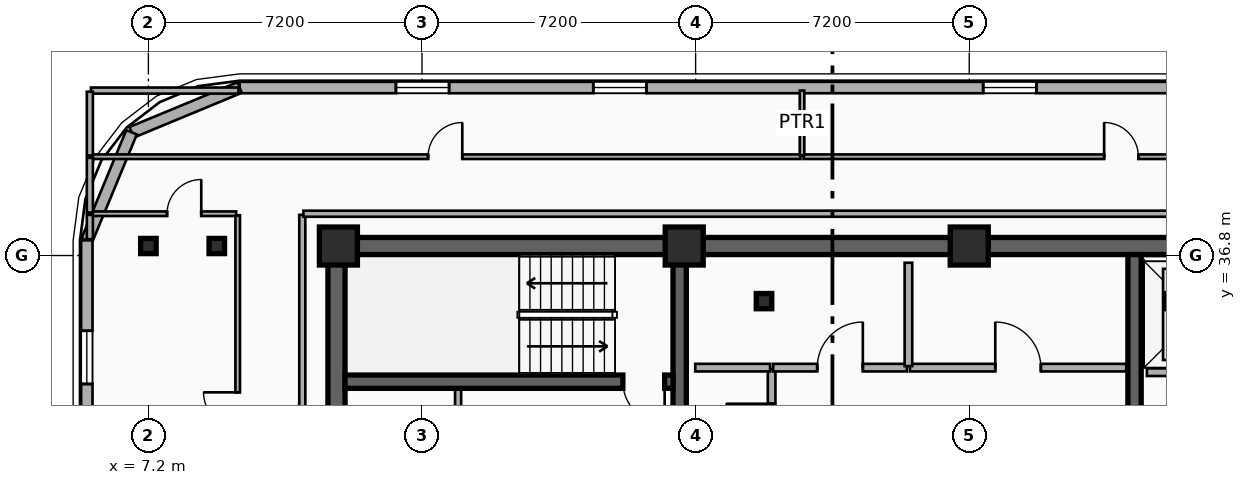
"""IFC4 building model, lengths in metres.
Left out: names, types, materials, properties, quantities, classifications, styles, units other than length and angle.
Written with IfcOpenShell. Run it as: python <this file> out.ifc"""

import sys

from ifc_helpers import new_model, si_unit, direction, frame, frame_2d, origin, origin_2d, place, context, subcontext, project, spatial, rectangle, i_section, extrude, element, fill, save


model = new_model("IFC4")
c1 = context("Model", 3, precision=1e-05, world=origin(), true_north=direction((0.0, 1.0)))
c2 = subcontext(c1, "Body", "Model", "MODEL_VIEW")
j1 = project(units=[si_unit("LENGTHUNIT", "METRE"), si_unit("PLANEANGLEUNIT", "RADIAN")], contexts=[c1])
p1 = place(None, origin())
s1 = spatial("IfcSite", under=j1, at=p1, CompositionType="ELEMENT")
p2 = place(p1, origin())
s2 = spatial("IfcBuilding", under=s1, at=p2, CompositionType="ELEMENT")
p3 = place(p2, frame((0.0, 0.0, 207.6)))
s3 = spatial("IfcBuildingStorey", under=s2, at=p3, CompositionType="ELEMENT", Elevation=207.6)
p4 = place(p3, frame((12.15, 37.05, 0.0), z_axis=(0.0, 0.0, 1.0), x_axis=(1.0, 0.0, 0.0)))
e1 = element("IfcWall", 1, at=p4, inside=s3, PredefinedType="SHEAR", context=c2, shape_type="SweptSolid", body=[
    extrude(rectangle(XDim=33.23, YDim=0.45, at=frame_2d((16.615, 0.0))), origin(), (0.0, 0.0, 1.0), 3.6),
])
p5 = place(p3, frame((12.15, 28.045, 0.0), z_axis=(0.0, 0.0, 1.0), x_axis=(0.0, 1.0, 0.0)))
e2 = element("IfcWall", 2, at=p5, inside=s3, PredefinedType="SHEAR", context=c2, shape_type="SweptSolid", body=[
    extrude(rectangle(XDim=8.78, YDim=0.45, at=frame_2d((4.39, 0.0))), origin(), (0.0, 0.0, 1.0), 3.6),
])
for number, where, z_axis, x_axis in (
    (3, (21.18, 28.045, 0.0), (0.0, 0.0, 1.0), (0.0, 1.0, 0.0)),
    (4, (33.15, 28.045, 0.0), (0.0, 0.0, 1.0), (0.0, 1.0, 0.0)),
):
    element("IfcWall", number, at=place(p3, frame(where, z_axis=z_axis, x_axis=x_axis)), inside=s3, PredefinedType="SHEAR", context=c2, shape_type="SweptSolid", body=[
        extrude(rectangle(XDim=8.78, YDim=0.35, at=frame_2d((4.39, 0.0))), origin(), (0.0, 0.0, 1.0), 3.6),
    ])
p6 = place(p3, frame((21.005, 33.48, 0.0), z_axis=(0.0, 0.0, 1.0), x_axis=(-1.0, 0.0, 0.0)))
e5 = element("IfcWall", 5, at=p6, inside=s3, PredefinedType="SHEAR", context=c2, shape_type="SweptSolid", body=[
    extrude(rectangle(XDim=8.63, YDim=0.35, at=frame_2d((4.315, 0.0))), origin(), (0.0, 0.0, 1.0), 3.6),
])
p7 = place(p6, frame((0.22, 0.0, 0.0)))
e6 = element("IfcOpeningElement", 6, at=p7, cuts=e5, PredefinedType="OPENING", context=c2, shape_type="SweptSolid", body=[
    extrude(rectangle(XDim=1.1, YDim=2.15, at=frame_2d((0.55, 1.075))), frame((0.0, 0.185, 0.0), z_axis=(0.0, -1.0, 0.0), x_axis=(1.0, 0.0, 0.0)), (0.0, 0.0, 1.0), 0.37),
])
p8 = place(p3, frame((23.4, 35.6, 0.0), z_axis=(0.0, 0.0, 1.0), x_axis=(1.0, 0.0, 0.0)))
e7 = element("IfcColumn", 7, at=p8, inside=s3, PredefinedType="COLUMN", context=c2, shape_type="SweptSolid", body=[
    extrude(i_section(OverallWidth=0.408, OverallDepth=0.4, WebThickness=0.025, FlangeThickness=0.039, FilletRadius=0.015, at=origin_2d()), origin(), (0.0, 0.0, 1.0), 3.6),
])
for number, where, z_axis, x_axis in (
    (8, (12.2, 37.05, 0.0), (0.0, 0.0, 1.0), (1.0, 0.0, 0.0)),
    (9, (21.3, 37.05, 0.0), (0.0, 0.0, 1.0), (1.0, 0.0, 0.0)),
    (10, (28.8, 37.05, 0.0), (0.0, 0.0, 1.0), (1.0, 0.0, 0.0)),
):
    element("IfcColumn", number, at=place(p3, frame(where, z_axis=z_axis, x_axis=x_axis)), inside=s3, PredefinedType="COLUMN", context=c2, shape_type="SweptSolid", body=[
        extrude(rectangle(XDim=1.0, YDim=1.0, at=origin_2d()), origin(), (0.0, 0.0, 1.0), 3.6),
    ])
for number, where, z_axis, x_axis in (
    (11, (9.0, 37.05, 0.0), (0.0, 0.0, 1.0), (1.0, 0.0, 0.0)),
    (12, (7.2, 37.05, 0.0), (0.0, 0.0, 1.0), (1.0, 0.0, 0.0)),
):
    element("IfcColumn", number, at=place(p3, frame(where, z_axis=z_axis, x_axis=x_axis)), inside=s3, PredefinedType="COLUMN", context=c2, shape_type="SweptSolid", body=[
        extrude(i_section(OverallWidth=0.408, OverallDepth=0.4, WebThickness=0.025, FlangeThickness=0.039, FilletRadius=0.015, at=origin_2d()), origin(), (0.0, 0.0, 1.0), 3.6),
    ])
p9 = place(p3, frame((9.6, 41.22, 0.0), z_axis=(0.0, 0.0, 1.0), x_axis=(1.0, 0.0, 0.0)))
e13 = element("IfcWall", 13, at=p9, inside=s3, PredefinedType="SOLIDWALL", context=c2, shape_type="SweptSolid", body=[
    extrude(rectangle(XDim=38.4, YDim=0.3, at=frame_2d((19.2, 0.0))), origin(), (0.0, 0.0, 1.0), 3.34),
])
p10 = place(p9, frame((4.113, 0.0, 0.75)))
e14 = element("IfcOpeningElement", 14, at=p10, cuts=e13, PredefinedType="OPENING", context=c2, shape_type="SweptSolid", body=[
    extrude(rectangle(XDim=1.4, YDim=2.1, at=frame_2d((0.7, 1.05))), frame((0.0, 0.16, 0.0), z_axis=(0.0, -1.0, 0.0), x_axis=(1.0, 0.0, 0.0)), (0.0, 0.0, 1.0), 0.32),
])
p11 = place(p9, frame((9.307, 0.0, 0.75)))
e15 = element("IfcOpeningElement", 15, at=p11, cuts=e13, PredefinedType="OPENING", context=c2, shape_type="SweptSolid", body=[
    extrude(rectangle(XDim=1.4, YDim=2.1, at=frame_2d((0.7, 1.05))), frame((0.0, 0.16, 0.0), z_axis=(0.0, -1.0, 0.0), x_axis=(1.0, 0.0, 0.0)), (0.0, 0.0, 1.0), 0.32),
])
p12 = place(p9, frame((19.567, 0.0, 0.75)))
e16 = element("IfcOpeningElement", 16, at=p12, cuts=e13, PredefinedType="OPENING", context=c2, shape_type="SweptSolid", body=[
    extrude(rectangle(XDim=1.4, YDim=2.1, at=frame_2d((0.7, 1.05))), frame((0.0, 0.16, 0.0), z_axis=(0.0, -1.0, 0.0), x_axis=(1.0, 0.0, 0.0)), (0.0, 0.0, 1.0), 0.32),
])
p13 = place(p9, frame((25.433, 0.0, 0.75)))
e17 = element("IfcOpeningElement", 17, at=p13, cuts=e13, PredefinedType="OPENING", context=c2, shape_type="SweptSolid", body=[
    extrude(rectangle(XDim=1.4, YDim=2.1, at=frame_2d((0.7, 1.05))), frame((0.0, 0.16, 0.0), z_axis=(0.0, -1.0, 0.0), x_axis=(1.0, 0.0, 0.0)), (0.0, 0.0, 1.0), 0.32),
])
p14 = place(p3, frame((6.757, 40.042, 0.0), z_axis=(0.0, 0.0, 1.0), x_axis=(0.923882414032, 0.382676475685, 0.0)))
e18 = element("IfcWall", 18, at=p14, inside=s3, PredefinedType="SOLIDWALL", context=c2, shape_type="SweptSolid", body=[
    extrude(rectangle(XDim=3.077, YDim=0.3, at=frame_2d((1.539, 0.0))), origin(), (0.0, 0.0, 1.0), 3.34),
])
p15 = place(p3, frame((5.58, 37.2, 0.0), z_axis=(0.0, 0.0, 1.0), x_axis=(0.382636798336, 0.92389884758, 0.0)))
e19 = element("IfcWall", 19, at=p15, inside=s3, PredefinedType="SOLIDWALL", context=c2, shape_type="SweptSolid", body=[
    extrude(rectangle(XDim=3.077, YDim=0.3, at=frame_2d((1.538, 0.0))), origin(), (0.0, 0.0, 1.0), 3.34),
])
p16 = place(p3, frame((5.58, 8.6, 0.0), z_axis=(0.0, 0.0, 1.0), x_axis=(0.0, 1.0, 0.0)))
e20 = element("IfcWall", 20, at=p16, inside=s3, PredefinedType="SOLIDWALL", context=c2, shape_type="SweptSolid", body=[
    extrude(rectangle(XDim=28.6, YDim=0.3, at=frame_2d((14.3, 0.0))), origin(), (0.0, 0.0, 1.0), 3.34),
])
p17 = place(p16, frame((21.36, 0.0, 0.34)))
e21 = element("IfcOpeningElement", 21, at=p17, cuts=e20, PredefinedType="OPENING", context=c2, shape_type="SweptSolid", body=[
    extrude(rectangle(XDim=1.4, YDim=2.1, at=frame_2d((0.7, 1.05))), frame((0.0, 0.16, 0.0), z_axis=(0.0, -1.0, 0.0), x_axis=(1.0, 0.0, 0.0)), (0.0, 0.0, 1.0), 0.32),
])
p18 = place(p16, frame((24.82, 0.0, 0.34)))
e22 = element("IfcOpeningElement", 22, at=p18, cuts=e20, PredefinedType="OPENING", context=c2, shape_type="SweptSolid", body=[
    extrude(rectangle(XDim=1.4, YDim=2.1, at=frame_2d((0.7, 1.05))), frame((0.0, 0.16, 0.0), z_axis=(0.0, -1.0, 0.0), x_axis=(1.0, 0.0, 0.0)), (0.0, 0.0, 1.0), 0.32),
])
p19 = place(p16, frame((4.797, 0.0, 0.34)))
e23 = element("IfcOpeningElement", 23, at=p19, cuts=e20, PredefinedType="OPENING", context=c2, shape_type="SweptSolid", body=[
    extrude(rectangle(XDim=1.4, YDim=2.1, at=frame_2d((0.7, 1.05))), frame((0.0, 0.16, 0.0), z_axis=(0.0, -1.0, 0.0), x_axis=(1.0, 0.0, 0.0)), (0.0, 0.0, 1.0), 0.32),
])
p20 = place(p16, frame((10.673, 0.0, 0.34)))
e24 = element("IfcOpeningElement", 24, at=p20, cuts=e20, PredefinedType="OPENING", context=c2, shape_type="SweptSolid", body=[
    extrude(rectangle(XDim=1.4, YDim=2.1, at=frame_2d((0.7, 1.05))), frame((0.0, 0.16, 0.0), z_axis=(0.0, -1.0, 0.0), x_axis=(1.0, 0.0, 0.0)), (0.0, 0.0, 1.0), 0.32),
])
p21 = place(p3, frame((33.475, 33.73, 0.0), z_axis=(0.0, 0.0, 1.0), x_axis=(1.0, 0.0, 0.0)))
e25 = element("IfcWall", 25, at=p21, inside=s3, PredefinedType="PARTITIONING", context=c2, shape_type="SweptSolid", body=[
    extrude(rectangle(XDim=2.725, YDim=0.2, at=frame_2d((1.362, 0.0))), origin(), (0.0, 0.0, 1.0), 2.41),
])
p22 = place(p21, frame((0.812, 0.0, 0.0)))
e26 = element("IfcOpeningElement", 26, at=p22, cuts=e25, PredefinedType="OPENING", context=c2, shape_type="SweptSolid", body=[
    extrude(rectangle(XDim=1.1, YDim=2.15, at=frame_2d((0.55, 1.075))), frame((0.0, 0.11, 0.0), z_axis=(0.0, -1.0, 0.0), x_axis=(1.0, 0.0, 0.0)), (0.0, 0.0, 1.0), 0.22),
])
p23 = place(p3, frame((23.6, 30.79, 0.0), z_axis=(0.0, 0.0, 1.0), x_axis=(0.0, 1.0, 0.0)))
e27 = element("IfcWall", 27, at=p23, inside=s3, PredefinedType="PARTITIONING", context=c2, shape_type="SweptSolid", body=[
    extrude(rectangle(XDim=3.02, YDim=0.2, at=frame_2d((1.51, 0.0))), origin(), (0.0, 0.0, 1.0), 3.34),
])
p24 = place(p23, frame((0.91, 0.0, 0.0)))
e28 = element("IfcOpeningElement", 28, at=p24, cuts=e27, PredefinedType="OPENING", context=c2, shape_type="SweptSolid", body=[
    extrude(rectangle(XDim=1.2, YDim=2.15, at=frame_2d((0.6, 1.075))), frame((0.0, 0.11, 0.0), z_axis=(0.0, -1.0, 0.0), x_axis=(1.0, 0.0, 0.0)), (0.0, 0.0, 1.0), 0.22),
])
p25 = place(p3, frame((23.64, 33.85, 0.0), z_axis=(0.0, 0.0, 1.0), x_axis=(1.0, 0.0, 0.0)))
e29 = element("IfcWall", 29, at=p25, inside=s3, PredefinedType="PARTITIONING", context=c2, shape_type="SweptSolid", body=[
    extrude(rectangle(XDim=3.52, YDim=0.2, at=frame_2d((1.76, 0.0))), origin(), (0.0, 0.0, 1.0), 3.34),
])
p26 = place(p25, frame((1.16, 0.0, 0.0)))
e30 = element("IfcOpeningElement", 30, at=p26, cuts=e29, PredefinedType="OPENING", context=c2, shape_type="SweptSolid", body=[
    extrude(rectangle(XDim=1.2, YDim=2.15, at=frame_2d((0.6, 1.075))), frame((0.0, 0.11, 0.0), z_axis=(0.0, -1.0, 0.0), x_axis=(1.0, 0.0, 0.0)), (0.0, 0.0, 1.0), 0.22),
])
p27 = place(p3, frame((27.24, 33.85, 0.0), z_axis=(0.0, 0.0, 1.0), x_axis=(1.0, 0.0, 0.0)))
e31 = element("IfcWall", 31, at=p27, inside=s3, PredefinedType="PARTITIONING", context=c2, shape_type="SweptSolid", body=[
    extrude(rectangle(XDim=5.69, YDim=0.2, at=frame_2d((2.845, 0.0))), origin(), (0.0, 0.0, 1.0), 2.41),
])
p28 = place(p27, frame((2.245, 0.0, 0.0)))
e32 = element("IfcOpeningElement", 32, at=p28, cuts=e31, PredefinedType="OPENING", context=c2, shape_type="SweptSolid", body=[
    extrude(rectangle(XDim=1.2, YDim=2.15, at=frame_2d((0.6, 1.075))), frame((0.0, 0.11, 0.0), z_axis=(0.0, -1.0, 0.0), x_axis=(1.0, 0.0, 0.0)), (0.0, 0.0, 1.0), 0.22),
])
p29 = place(p3, frame((21.59, 33.85, 0.0), z_axis=(0.0, 0.0, 1.0), x_axis=(1.0, 0.0, 0.0)))
e33 = element("IfcWall", 33, at=p29, inside=s3, PredefinedType="PARTITIONING", context=c2, shape_type="SweptSolid", body=[
    extrude(rectangle(XDim=1.97, YDim=0.2, at=frame_2d((0.985, 0.0))), origin(), (0.0, 0.0, 1.0), 2.41),
])
p30 = place(p3, frame((27.2, 33.89, 0.0), z_axis=(0.0, 0.0, 1.0), x_axis=(0.0, 1.0, 0.0)))
e34 = element("IfcWall", 34, at=p30, inside=s3, PredefinedType="PARTITIONING", context=c2, shape_type="SweptSolid", body=[
    extrude(rectangle(XDim=2.72, YDim=0.2, at=frame_2d((1.36, 0.0))), origin(), (0.0, 0.0, 1.0), 3.34),
])
p31 = place(p3, frame((9.55, 27.64, 0.0), z_axis=(0.0, 0.0, 1.0), x_axis=(0.0, 1.0, 0.0)))
e35 = element("IfcWall", 35, at=p31, inside=s3, PredefinedType="PARTITIONING", context=c2, shape_type="SweptSolid", body=[
    extrude(rectangle(XDim=10.22, YDim=0.12, at=frame_2d((5.11, 0.0))), origin(), (0.0, 0.0, 1.0), 2.82),
])
p32 = place(p31, frame((4.66, 0.0, 0.0)))
e36 = element("IfcOpeningElement", 36, at=p32, cuts=e35, PredefinedType="OPENING", context=c2, shape_type="SweptSolid", body=[
    extrude(rectangle(XDim=0.9, YDim=2.1, at=frame_2d((0.45, 1.05))), frame((0.0, 0.07, 0.0), z_axis=(0.0, -1.0, 0.0), x_axis=(1.0, 0.0, 0.0)), (0.0, 0.0, 1.0), 0.14),
])
p33 = place(p3, frame((5.66, 37.9, 0.0), z_axis=(0.0, 0.0, 1.0), x_axis=(1.0, 0.0, 0.0)))
e37 = element("IfcWall", 37, at=p33, inside=s3, PredefinedType="PARTITIONING", context=c2, shape_type="SweptSolid", body=[
    extrude(rectangle(XDim=3.85, YDim=0.12, at=frame_2d((1.925, 0.0))), origin(), (0.0, 0.0, 1.0), 3.34),
])
p34 = place(p33, frame((2.031, 0.0, 0.0)))
e38 = element("IfcOpeningElement", 38, at=p34, cuts=e37, PredefinedType="OPENING", context=c2, shape_type="SweptSolid", body=[
    extrude(rectangle(XDim=0.9, YDim=2.1, at=frame_2d((0.45, 1.05))), frame((0.0, 0.07, 0.0), z_axis=(0.0, -1.0, 0.0), x_axis=(1.0, 0.0, 0.0)), (0.0, 0.0, 1.0), 0.14),
])
p35 = place(p3, frame((5.66, 39.4, 0.0), z_axis=(0.0, 0.0, 1.0), x_axis=(1.0, 0.0, 0.0)))
e39 = element("IfcWall", 39, at=p35, inside=s3, PredefinedType="PARTITIONING", context=c2, shape_type="SweptSolid", body=[
    extrude(rectangle(XDim=18.7, YDim=0.12, at=frame_2d((9.35, 0.0))), origin(), (0.0, 0.0, 1.0), 3.34),
])
p36 = place(p35, frame((8.9, 0.0, 0.0)))
e40 = element("IfcOpeningElement", 40, at=p36, cuts=e39, PredefinedType="OPENING", context=c2, shape_type="SweptSolid", body=[
    extrude(rectangle(XDim=0.9, YDim=2.1, at=frame_2d((0.45, 1.05))), frame((0.0, 0.07, 0.0), z_axis=(0.0, -1.0, 0.0), x_axis=(1.0, 0.0, 0.0)), (0.0, 0.0, 1.0), 0.14),
])
p37 = place(p3, frame((24.44, 39.4, 0.0), z_axis=(0.0, 0.0, 1.0), x_axis=(1.0, 0.0, 0.0)))
e41 = element("IfcWall", 41, at=p37, inside=s3, PredefinedType="PARTITIONING", context=c2, shape_type="SweptSolid", body=[
    extrude(rectangle(XDim=16.72, YDim=0.12, at=frame_2d((8.36, 0.0))), origin(), (0.0, 0.0, 1.0), 3.34),
])
p38 = place(p37, frame((7.91, 0.0, 0.0)))
e42 = element("IfcOpeningElement", 42, at=p38, cuts=e41, PredefinedType="OPENING", context=c2, shape_type="SweptSolid", body=[
    extrude(rectangle(XDim=0.9, YDim=2.1, at=frame_2d((0.45, 1.05))), frame((0.0, 0.07, 0.0), z_axis=(0.0, -1.0, 0.0), x_axis=(1.0, 0.0, 0.0)), (0.0, 0.0, 1.0), 0.14),
])
p39 = place(p3, frame((24.4, 39.44, 0.0), z_axis=(0.0, 0.0, 1.0), x_axis=(0.0, 1.0, 0.0)))
e43 = element("IfcWall", 43, at=p39, inside=s3, PredefinedType="PARTITIONING", context=c2, shape_type="SweptSolid", body=[
    extrude(rectangle(XDim=1.7, YDim=0.12, at=frame_2d((0.85, 0.0))), origin(), (0.0, 0.0, 1.0), 3.34),
])
p40 = place(p3, frame((15.35, 30.96, 0.0), z_axis=(0.0, 0.0, 1.0), x_axis=(0.0, 1.0, 0.0)))
e44 = element("IfcWall", 44, at=p40, inside=s3, PredefinedType="PARTITIONING", context=c2, shape_type="SweptSolid", body=[
    extrude(rectangle(XDim=2.31, YDim=0.16, at=frame_2d((1.155, 0.0))), origin(), (0.0, 0.0, 1.0), 3.34),
])
p41 = place(p3, frame((11.25, 27.63, 0.0), z_axis=(0.0, 0.0, 1.0), x_axis=(0.0, 1.0, 0.0)))
e45 = element("IfcWall", 45, at=p41, inside=s3, PredefinedType="PARTITIONING", context=c2, shape_type="SweptSolid", body=[
    extrude(rectangle(XDim=10.24, YDim=0.16, at=frame_2d((5.12, 0.0))), origin(), (0.0, 0.0, 1.0), 2.82),
])
p42 = place(p3, frame((11.28, 37.9, 0.0), z_axis=(0.0, 0.0, 1.0), x_axis=(1.0, 0.0, 0.0)))
e46 = element("IfcWall", 46, at=p42, inside=s3, PredefinedType="PARTITIONING", context=c2, shape_type="SweptSolid", body=[
    extrude(rectangle(XDim=35.04, YDim=0.16, at=frame_2d((17.52, 0.0))), origin(), (0.0, 0.0, 1.0), 3.34),
])
p43 = place(p3, frame((5.66, 37.93, 0.0), z_axis=(0.0, 0.0, 1.0), x_axis=(0.0, 1.0, 0.0)))
e47 = element("IfcWall", 47, at=p43, inside=s3, PredefinedType="PARTITIONING", context=c2, shape_type="SweptSolid", body=[
    extrude(rectangle(XDim=1.44, YDim=0.16, at=frame_2d((0.72, 0.0))), origin(), (0.0, 0.0, 1.0), 3.34),
])
p44 = place(p3, frame((5.66, 37.23, 0.0), z_axis=(0.0, 0.0, 1.0), x_axis=(0.0, 1.0, 0.0)))
e48 = element("IfcWall", 48, at=p44, inside=s3, PredefinedType="PARTITIONING", context=c2, shape_type="SweptSolid", body=[
    extrude(rectangle(XDim=0.64, YDim=0.16, at=frame_2d((0.32, 0.0))), origin(), (0.0, 0.0, 1.0), 3.34),
])
p45 = place(p3, frame((5.69, 41.14, 0.0), z_axis=(0.0, 0.0, 1.0), x_axis=(1.0, 0.0, 0.0)))
e49 = element("IfcWall", 49, at=p45, inside=s3, PredefinedType="PARTITIONING", context=c2, shape_type="SweptSolid", body=[
    extrude(rectangle(XDim=3.88, YDim=0.16, at=frame_2d((1.94, 0.0))), origin(), (0.0, 0.0, 1.0), 3.34),
])
p46 = place(p3, frame((5.66, 39.43, 0.0), z_axis=(0.0, 0.0, 1.0), x_axis=(0.0, 1.0, 0.0)))
e50 = element("IfcWall", 50, at=p46, inside=s3, PredefinedType="PARTITIONING", context=c2, shape_type="SweptSolid", body=[
    extrude(rectangle(XDim=1.68, YDim=0.16, at=frame_2d((0.84, 0.0))), origin(), (0.0, 0.0, 1.0), 3.34),
])
p47 = place(p10, origin())
e51 = element("IfcWindow", 51, at=p47, inside=s3, PartitioningType="SINGLE_PANEL", PredefinedType="WINDOW", context=c2, shape_type="SweptSolid", body=[
    extrude(rectangle(XDim=1.4, YDim=2.1, at=frame_2d((0.7, 1.05))), frame((0.0, 0.03, 0.0), z_axis=(0.0, -1.0, 0.0), x_axis=(1.0, 0.0, 0.0)), (0.0, 0.0, 1.0), 0.06),
])
fill(e14, e51)
p48 = place(p11, origin())
e52 = element("IfcWindow", 52, at=p48, inside=s3, PartitioningType="SINGLE_PANEL", PredefinedType="WINDOW", context=c2, shape_type="SweptSolid", body=[
    extrude(rectangle(XDim=1.4, YDim=2.1, at=frame_2d((0.7, 1.05))), frame((0.0, 0.03, 0.0), z_axis=(0.0, -1.0, 0.0), x_axis=(1.0, 0.0, 0.0)), (0.0, 0.0, 1.0), 0.06),
])
fill(e15, e52)
p49 = place(p12, origin())
e53 = element("IfcWindow", 53, at=p49, inside=s3, PartitioningType="SINGLE_PANEL", PredefinedType="WINDOW", context=c2, shape_type="SweptSolid", body=[
    extrude(rectangle(XDim=1.4, YDim=2.1, at=frame_2d((0.7, 1.05))), frame((0.0, 0.03, 0.0), z_axis=(0.0, -1.0, 0.0), x_axis=(1.0, 0.0, 0.0)), (0.0, 0.0, 1.0), 0.06),
])
fill(e16, e53)
p50 = place(p18, origin())
e54 = element("IfcWindow", 54, at=p50, inside=s3, PartitioningType="SINGLE_PANEL", PredefinedType="WINDOW", context=c2, shape_type="SweptSolid", body=[
    extrude(rectangle(XDim=1.4, YDim=2.1, at=frame_2d((0.7, 1.05))), frame((0.0, 0.03, 0.0), z_axis=(0.0, -1.0, 0.0), x_axis=(1.0, 0.0, 0.0)), (0.0, 0.0, 1.0), 0.06),
])
fill(e22, e54)
p51 = place(p7, origin())
e55 = element("IfcDoor", 55, at=p51, inside=s3, OperationType="SINGLE_SWING_LEFT", PredefinedType="DOOR", context=c2, shape_type="SweptSolid", body=[
    extrude(rectangle(XDim=1.1, YDim=2.15, at=frame_2d((0.55, 1.075))), frame((0.0, 0.025, 0.0), z_axis=(0.0, -1.0, 0.0), x_axis=(1.0, 0.0, 0.0)), (0.0, 0.0, 1.0), 0.05),
])
fill(e6, e55)
p52 = place(p24, origin())
e56 = element("IfcDoor", 56, at=p52, inside=s3, OperationType="SINGLE_SWING_RIGHT", PredefinedType="DOOR", context=c2, shape_type="SweptSolid", body=[
    extrude(rectangle(XDim=1.2, YDim=2.15, at=frame_2d((0.6, 1.075))), frame((0.0, 0.025, 0.0), z_axis=(0.0, -1.0, 0.0), x_axis=(1.0, 0.0, 0.0)), (0.0, 0.0, 1.0), 0.05),
])
fill(e28, e56)
p53 = place(p26, origin())
e57 = element("IfcDoor", 57, at=p53, inside=s3, OperationType="SINGLE_SWING_RIGHT", PredefinedType="DOOR", context=c2, shape_type="SweptSolid", body=[
    extrude(rectangle(XDim=1.2, YDim=2.15, at=frame_2d((0.6, 1.075))), frame((0.0, 0.025, 0.0), z_axis=(0.0, -1.0, 0.0), x_axis=(1.0, 0.0, 0.0)), (0.0, 0.0, 1.0), 0.05),
])
fill(e30, e57)
p54 = place(p28, origin())
e58 = element("IfcDoor", 58, at=p54, inside=s3, OperationType="SINGLE_SWING_LEFT", PredefinedType="DOOR", context=c2, shape_type="SweptSolid", body=[
    extrude(rectangle(XDim=1.2, YDim=2.15, at=frame_2d((0.6, 1.075))), frame((0.0, 0.025, 0.0), z_axis=(0.0, -1.0, 0.0), x_axis=(1.0, 0.0, 0.0)), (0.0, 0.0, 1.0), 0.05),
])
fill(e32, e58)
p55 = place(p32, origin())
e59 = element("IfcDoor", 59, at=p55, inside=s3, OperationType="SINGLE_SWING_RIGHT", PredefinedType="DOOR", context=c2, shape_type="SweptSolid", body=[
    extrude(rectangle(XDim=0.9, YDim=2.1, at=frame_2d((0.45, 1.05))), frame((0.0, 0.025, 0.0), z_axis=(0.0, -1.0, 0.0), x_axis=(1.0, 0.0, 0.0)), (0.0, 0.0, 1.0), 0.05),
])
fill(e36, e59)
p56 = place(p34, origin())
e60 = element("IfcDoor", 60, at=p56, inside=s3, OperationType="SINGLE_SWING_RIGHT", PredefinedType="DOOR", context=c2, shape_type="SweptSolid", body=[
    extrude(rectangle(XDim=0.9, YDim=2.1, at=frame_2d((0.45, 1.05))), frame((0.0, 0.025, 0.0), z_axis=(0.0, -1.0, 0.0), x_axis=(1.0, 0.0, 0.0)), (0.0, 0.0, 1.0), 0.05),
])
fill(e38, e60)
p57 = place(p36, origin())
e61 = element("IfcDoor", 61, at=p57, inside=s3, OperationType="SINGLE_SWING_RIGHT", PredefinedType="DOOR", context=c2, shape_type="SweptSolid", body=[
    extrude(rectangle(XDim=0.9, YDim=2.1, at=frame_2d((0.45, 1.05))), frame((0.0, 0.025, 0.0), z_axis=(0.0, -1.0, 0.0), x_axis=(1.0, 0.0, 0.0)), (0.0, 0.0, 1.0), 0.05),
])
fill(e40, e61)
p58 = place(p38, origin())
e62 = element("IfcDoor", 62, at=p58, inside=s3, OperationType="SINGLE_SWING_LEFT", PredefinedType="DOOR", context=c2, shape_type="SweptSolid", body=[
    extrude(rectangle(XDim=0.9, YDim=2.1, at=frame_2d((0.45, 1.05))), frame((0.0, 0.025, 0.0), z_axis=(0.0, -1.0, 0.0), x_axis=(1.0, 0.0, 0.0)), (0.0, 0.0, 1.0), 0.05),
])
fill(e42, e62)
save(model, sys.argv[1])
